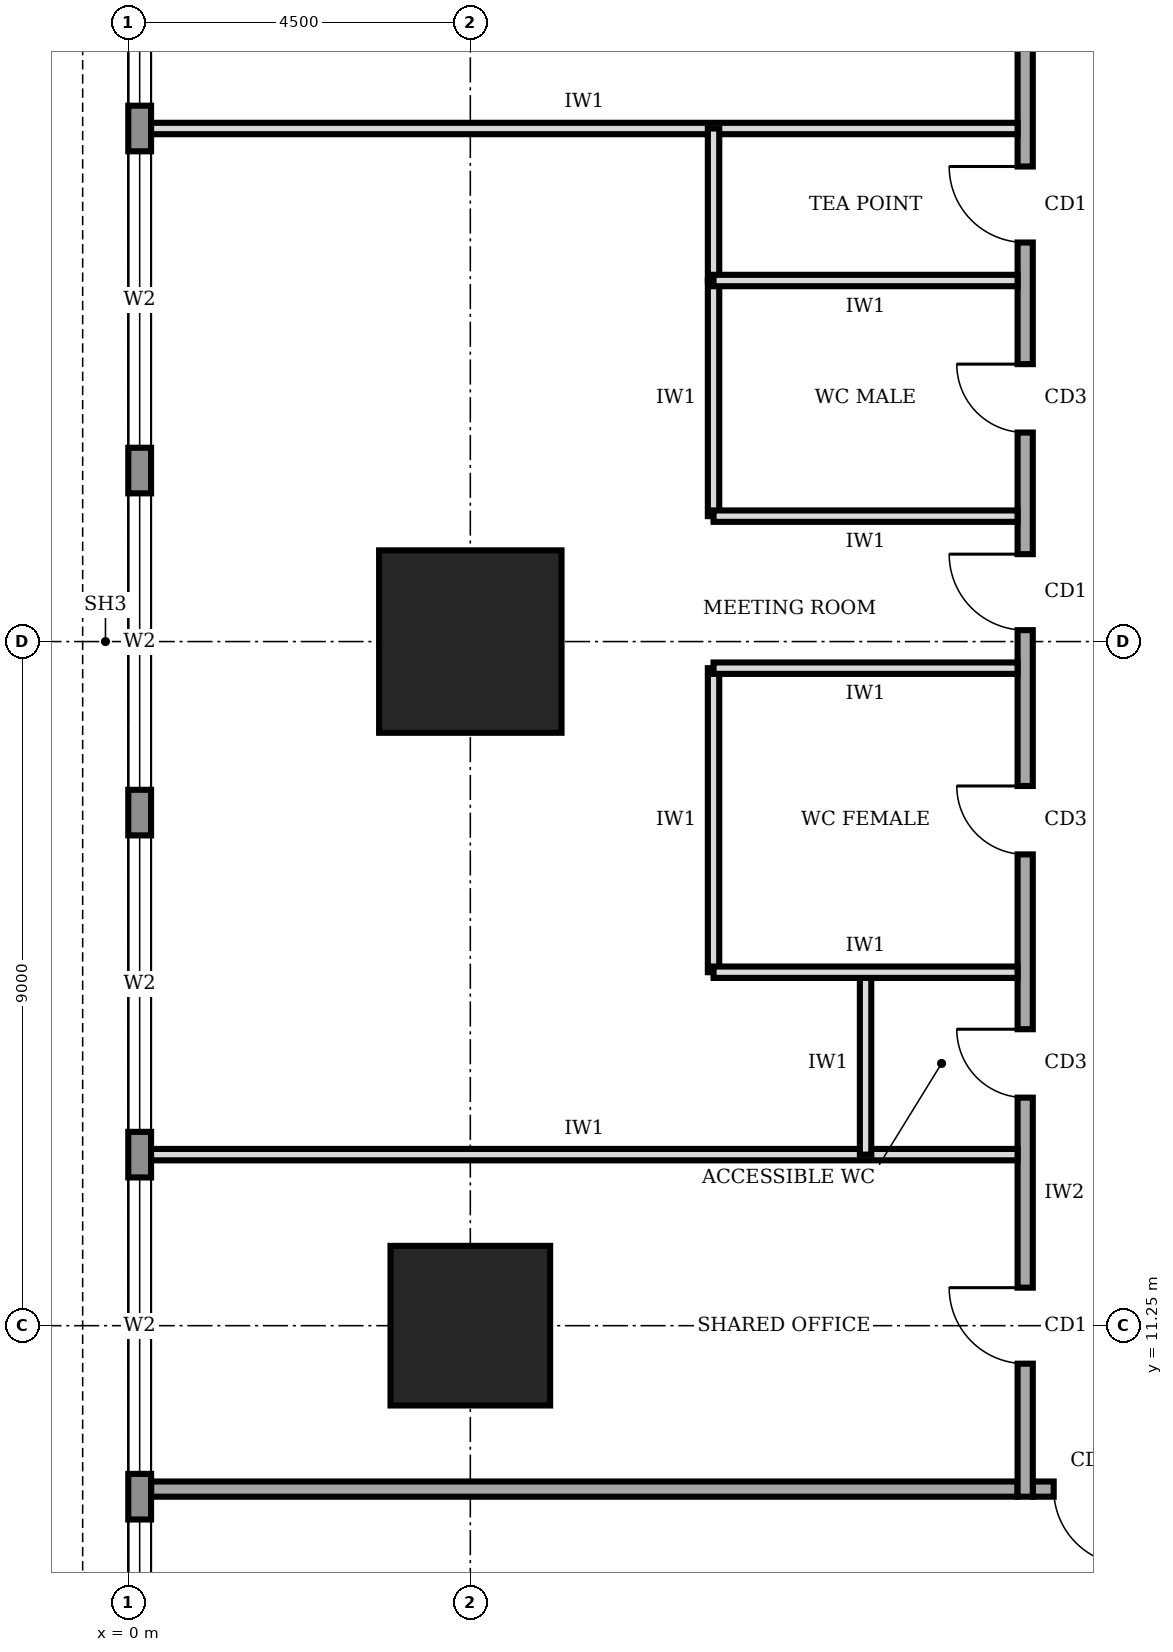
"""IFC4 building model, lengths in metres.
Left out: names, types, materials, properties, quantities, classifications, styles, units other than length and angle.
Written with IfcOpenShell. Run it as: python <this file> out.ifc"""

import sys

from ifc_helpers import new_model, si_unit, direction, frame, frame_2d, origin, origin_2d, place, context, subcontext, project, spatial, rectangle, extrude, element, fill, save


model = new_model("IFC4")
c1 = context("Model", 3, precision=1e-05, world=origin(), true_north=direction((0.0, 1.0)))
c2 = subcontext(c1, "Body", "Model", "MODEL_VIEW")
j1 = project(units=[si_unit("LENGTHUNIT", "METRE"), si_unit("PLANEANGLEUNIT", "RADIAN")], contexts=[c1])
p1 = place(None, origin())
s1 = spatial("IfcSite", under=j1, at=p1, CompositionType="ELEMENT")
p2 = place(p1, origin())
s2 = spatial("IfcBuilding", under=s1, at=p2, CompositionType="ELEMENT")
p3 = place(p2, frame((0.0, 0.0, 145.0)))
s3 = spatial("IfcBuildingStorey", under=s2, at=p3, CompositionType="ELEMENT", Elevation=145.0)
p4 = place(p3, frame((4.5, 11.25, 0.0), z_axis=(0.0, 0.0, 1.0), x_axis=(1.0, 0.0, 0.0)))
e1 = element("IfcColumn", 1, at=p4, inside=s3, PredefinedType="COLUMN", context=c2, shape_type="SweptSolid", body=[
    extrude(rectangle(XDim=2.1, YDim=2.1, at=origin_2d()), origin(), (0.0, 0.0, 1.0), 4.0),
])
p5 = place(p3, frame((4.5, 20.25, 0.0), z_axis=(0.0, 0.0, 1.0), x_axis=(1.0, 0.0, 0.0)))
e2 = element("IfcColumn", 2, at=p5, inside=s3, PredefinedType="COLUMN", context=c2, shape_type="SweptSolid", body=[
    extrude(rectangle(XDim=2.4, YDim=2.4, at=origin_2d()), origin(), (0.0, 0.0, 1.0), 4.0),
])
p6 = place(p3, frame((0.15, 35.98, 0.0), z_axis=(0.0, 0.0, 1.0), x_axis=(0.0, -1.0, 0.0)))
e3 = element("IfcWall", 3, at=p6, inside=s3, PredefinedType="STANDARD", context=c2, shape_type="SweptSolid", body=[
    extrude(rectangle(XDim=31.46, YDim=0.3, at=frame_2d((15.73, 0.0))), origin(), (0.0, 0.0, 1.0), 3.75),
])
p7 = place(p6, frame((27.28, 0.0, 0.6)))
e4 = element("IfcOpeningElement", 4, at=p7, cuts=e3, PredefinedType="OPENING", context=c2, shape_type="SweptSolid", body=[
    extrude(rectangle(XDim=3.9, YDim=2.6, at=frame_2d((1.95, 1.3))), frame((0.0, 0.16, 0.0), z_axis=(0.0, -1.0, 0.0), x_axis=(1.0, 0.0, 0.0)), (0.0, 0.0, 1.0), 0.32),
])
p8 = place(p6, frame((22.78, 0.0, 0.6)))
e5 = element("IfcOpeningElement", 5, at=p8, cuts=e3, PredefinedType="OPENING", context=c2, shape_type="SweptSolid", body=[
    extrude(rectangle(XDim=3.9, YDim=2.6, at=frame_2d((1.95, 1.3))), frame((0.0, 0.16, 0.0), z_axis=(0.0, -1.0, 0.0), x_axis=(1.0, 0.0, 0.0)), (0.0, 0.0, 1.0), 0.32),
])
p9 = place(p6, frame((18.28, 0.0, 0.6)))
e6 = element("IfcOpeningElement", 6, at=p9, cuts=e3, PredefinedType="OPENING", context=c2, shape_type="SweptSolid", body=[
    extrude(rectangle(XDim=3.9, YDim=2.6, at=frame_2d((1.95, 1.3))), frame((0.0, 0.16, 0.0), z_axis=(0.0, -1.0, 0.0), x_axis=(1.0, 0.0, 0.0)), (0.0, 0.0, 1.0), 0.32),
])
p10 = place(p6, frame((13.78, 0.0, 0.6)))
e7 = element("IfcOpeningElement", 7, at=p10, cuts=e3, PredefinedType="OPENING", context=c2, shape_type="SweptSolid", body=[
    extrude(rectangle(XDim=3.9, YDim=2.6, at=frame_2d((1.95, 1.3))), frame((0.0, 0.16, 0.0), z_axis=(0.0, -1.0, 0.0), x_axis=(1.0, 0.0, 0.0)), (0.0, 0.0, 1.0), 0.32),
])
p11 = place(p6, frame((9.28, 0.0, 0.6)))
e8 = element("IfcOpeningElement", 8, at=p11, cuts=e3, PredefinedType="OPENING", context=c2, shape_type="SweptSolid", body=[
    extrude(rectangle(XDim=3.9, YDim=2.6, at=frame_2d((1.95, 1.3))), frame((0.0, 0.16, 0.0), z_axis=(0.0, -1.0, 0.0), x_axis=(1.0, 0.0, 0.0)), (0.0, 0.0, 1.0), 0.32),
])
p12 = place(p6, frame((4.78, 0.0, 0.6)))
e9 = element("IfcOpeningElement", 9, at=p12, cuts=e3, PredefinedType="OPENING", context=c2, shape_type="SweptSolid", body=[
    extrude(rectangle(XDim=3.9, YDim=2.6, at=frame_2d((1.95, 1.3))), frame((0.0, 0.16, 0.0), z_axis=(0.0, -1.0, 0.0), x_axis=(1.0, 0.0, 0.0)), (0.0, 0.0, 1.0), 0.32),
])
p13 = place(p3, frame((11.9, 9.1, 0.0), z_axis=(0.0, 0.0, 1.0), x_axis=(1.0, 0.0, 0.0)))
e10 = element("IfcWall", 10, at=p13, inside=s3, PredefinedType="SOLIDWALL", context=c2, shape_type="SweptSolid", body=[
    extrude(rectangle(XDim=28.3, YDim=0.2, at=frame_2d((14.15, 0.0))), origin(), (0.0, 0.0, 1.0), 3.75),
])
p14 = place(p13, frame((0.275, 0.0, 0.0)))
e11 = element("IfcOpeningElement", 11, at=p14, cuts=e10, PredefinedType="OPENING", context=c2, shape_type="SweptSolid", body=[
    extrude(rectangle(XDim=1.0, YDim=2.1, at=frame_2d((0.5, 1.05))), frame((0.0, 0.11, 0.0), z_axis=(0.0, -1.0, 0.0), x_axis=(1.0, 0.0, 0.0)), (0.0, 0.0, 1.0), 0.22),
])
p15 = place(p13, frame((5.6, 0.0, 0.0)))
e12 = element("IfcOpeningElement", 12, at=p15, cuts=e10, PredefinedType="OPENING", context=c2, shape_type="SweptSolid", body=[
    extrude(rectangle(XDim=1.0, YDim=2.1, at=frame_2d((0.5, 1.05))), frame((0.0, 0.11, 0.0), z_axis=(0.0, -1.0, 0.0), x_axis=(1.0, 0.0, 0.0)), (0.0, 0.0, 1.0), 0.22),
])
p16 = place(p13, frame((12.35, 0.0, 0.0)))
e13 = element("IfcOpeningElement", 13, at=p16, cuts=e10, PredefinedType="OPENING", context=c2, shape_type="SweptSolid", body=[
    extrude(rectangle(XDim=1.0, YDim=2.1, at=frame_2d((0.5, 1.05))), frame((0.0, 0.11, 0.0), z_axis=(0.0, -1.0, 0.0), x_axis=(1.0, 0.0, 0.0)), (0.0, 0.0, 1.0), 0.22),
])
p17 = place(p13, frame((20.9, 0.0, 0.0)))
e14 = element("IfcOpeningElement", 14, at=p17, cuts=e10, PredefinedType="OPENING", context=c2, shape_type="SweptSolid", body=[
    extrude(rectangle(XDim=1.8, YDim=2.1, at=frame_2d((0.9, 1.05))), frame((0.0, 0.11, 0.0), z_axis=(0.0, -1.0, 0.0), x_axis=(1.0, 0.0, 0.0)), (0.0, 0.0, 1.0), 0.22),
])
p18 = place(p3, frame((11.8, 31.3, 0.0), z_axis=(0.0, 0.0, 1.0), x_axis=(0.0, -1.0, 0.0)))
e15 = element("IfcWall", 15, at=p18, inside=s3, PredefinedType="SOLIDWALL", context=c2, shape_type="SweptSolid", body=[
    extrude(rectangle(XDim=22.3, YDim=0.2, at=frame_2d((11.15, 0.0))), origin(), (0.0, 0.0, 1.0), 3.75),
])
p19 = place(p18, frame((19.55, 0.0, 0.0)))
e16 = element("IfcOpeningElement", 16, at=p19, cuts=e15, PredefinedType="OPENING", context=c2, shape_type="SweptSolid", body=[
    extrude(rectangle(XDim=1.0, YDim=2.1, at=frame_2d((0.5, 1.05))), frame((0.0, 0.11, 0.0), z_axis=(0.0, -1.0, 0.0), x_axis=(1.0, 0.0, 0.0)), (0.0, 0.0, 1.0), 0.22),
])
p20 = place(p18, frame((16.15, 0.0, 0.0)))
e17 = element("IfcOpeningElement", 17, at=p20, cuts=e15, PredefinedType="OPENING", context=c2, shape_type="SweptSolid", body=[
    extrude(rectangle(XDim=0.9, YDim=2.1, at=frame_2d((0.45, 1.05))), frame((0.0, 0.11, 0.0), z_axis=(0.0, -1.0, 0.0), x_axis=(1.0, 0.0, 0.0)), (0.0, 0.0, 1.0), 0.22),
])
p21 = place(p18, frame((12.95, 0.0, 0.0)))
e18 = element("IfcOpeningElement", 18, at=p21, cuts=e15, PredefinedType="OPENING", context=c2, shape_type="SweptSolid", body=[
    extrude(rectangle(XDim=0.9, YDim=2.1, at=frame_2d((0.45, 1.05))), frame((0.0, 0.11, 0.0), z_axis=(0.0, -1.0, 0.0), x_axis=(1.0, 0.0, 0.0)), (0.0, 0.0, 1.0), 0.22),
])
p22 = place(p18, frame((7.4, 0.0, 0.0)))
e19 = element("IfcOpeningElement", 19, at=p22, cuts=e15, PredefinedType="OPENING", context=c2, shape_type="SweptSolid", body=[
    extrude(rectangle(XDim=0.9, YDim=2.1, at=frame_2d((0.45, 1.05))), frame((0.0, 0.11, 0.0), z_axis=(0.0, -1.0, 0.0), x_axis=(1.0, 0.0, 0.0)), (0.0, 0.0, 1.0), 0.22),
])
p23 = place(p18, frame((4.8, 0.0, 0.0)))
e20 = element("IfcOpeningElement", 20, at=p23, cuts=e15, PredefinedType="OPENING", context=c2, shape_type="SweptSolid", body=[
    extrude(rectangle(XDim=1.0, YDim=2.1, at=frame_2d((0.5, 1.05))), frame((0.0, 0.11, 0.0), z_axis=(0.0, -1.0, 0.0), x_axis=(1.0, 0.0, 0.0)), (0.0, 0.0, 1.0), 0.22),
])
p24 = place(p18, frame((9.9, 0.0, 0.0)))
e21 = element("IfcOpeningElement", 21, at=p24, cuts=e15, PredefinedType="OPENING", context=c2, shape_type="SweptSolid", body=[
    extrude(rectangle(XDim=1.0, YDim=2.1, at=frame_2d((0.5, 1.05))), frame((0.0, 0.11, 0.0), z_axis=(0.0, -1.0, 0.0), x_axis=(1.0, 0.0, 0.0)), (0.0, 0.0, 1.0), 0.22),
])
p25 = place(p18, frame((1.55, 0.0, 0.0)))
e22 = element("IfcOpeningElement", 22, at=p25, cuts=e15, PredefinedType="OPENING", context=c2, shape_type="SweptSolid", body=[
    extrude(rectangle(XDim=1.0, YDim=2.1, at=frame_2d((0.5, 1.05))), frame((0.0, 0.11, 0.0), z_axis=(0.0, -1.0, 0.0), x_axis=(1.0, 0.0, 0.0)), (0.0, 0.0, 1.0), 0.22),
])
p26 = place(p3, frame((0.3, 9.1, 0.0), z_axis=(0.0, 0.0, 1.0), x_axis=(1.0, 0.0, 0.0)))
e23 = element("IfcWall", 23, at=p26, inside=s3, PredefinedType="SOLIDWALL", context=c2, shape_type="SweptSolid", body=[
    extrude(rectangle(XDim=11.4, YDim=0.2, at=frame_2d((5.7, 0.0))), origin(), (0.0, 0.0, 1.0), 3.75),
])
for number, where, z_axis, x_axis in (
    (24, (0.3, 13.5, 0.0), (0.0, 0.0, 1.0), (1.0, 0.0, 0.0)),
    (25, (0.3, 27.0, 0.0), (0.0, 0.0, 1.0), (1.0, 0.0, 0.0)),
):
    element("IfcWall", number, at=place(p3, frame(where, z_axis=z_axis, x_axis=x_axis)), inside=s3, PredefinedType="PARTITIONING", context=c2, shape_type="SweptSolid", body=[
        extrude(rectangle(XDim=11.4, YDim=0.15, at=frame_2d((5.7, 0.0))), origin(), (0.0, 0.0, 1.0), 3.75),
    ])
p27 = place(p3, frame((11.7, 15.9, 0.0), z_axis=(0.0, 0.0, 1.0), x_axis=(-1.0, 0.0, 0.0)))
e26 = element("IfcWall", 26, at=p27, inside=s3, PredefinedType="PARTITIONING", context=c2, shape_type="SweptSolid", body=[
    extrude(rectangle(XDim=4.0, YDim=0.15, at=frame_2d((2.0, 0.0))), origin(), (0.0, 0.0, 1.0), 3.75),
])
p28 = place(p3, frame((11.7, 19.9, 0.0), z_axis=(0.0, 0.0, 1.0), x_axis=(-1.0, 0.0, 0.0)))
e27 = element("IfcWall", 27, at=p28, inside=s3, PredefinedType="PARTITIONING", context=c2, shape_type="SweptSolid", body=[
    extrude(rectangle(XDim=4.0, YDim=0.15, at=frame_2d((2.0, 0.0))), origin(), (0.0, 0.0, 1.0), 2.85),
])
for number, where, z_axis, x_axis in (
    (28, (11.7, 21.9, 0.0), (0.0, 0.0, 1.0), (-1.0, 0.0, 0.0)),
    (29, (11.7, 25.0, 0.0), (0.0, 0.0, 1.0), (-1.0, 0.0, 0.0)),
):
    element("IfcWall", number, at=place(p3, frame(where, z_axis=z_axis, x_axis=x_axis)), inside=s3, PredefinedType="PARTITIONING", context=c2, shape_type="SweptSolid", body=[
        extrude(rectangle(XDim=4.0, YDim=0.15, at=frame_2d((2.0, 0.0))), origin(), (0.0, 0.0, 1.0), 3.75),
    ])
p29 = place(p3, frame((9.7, 13.5, 0.0), z_axis=(0.0, 0.0, 1.0), x_axis=(0.0, 1.0, 0.0)))
e30 = element("IfcWall", 30, at=p29, inside=s3, PredefinedType="PARTITIONING", context=c2, shape_type="SweptSolid", body=[
    extrude(rectangle(XDim=2.4, YDim=0.15, at=frame_2d((1.2, 0.0))), origin(), (0.0, 0.0, 1.0), 3.75),
])
p30 = place(p3, frame((7.7, 15.9, 0.0), z_axis=(0.0, 0.0, 1.0), x_axis=(0.0, 1.0, 0.0)))
e31 = element("IfcWall", 31, at=p30, inside=s3, PredefinedType="PARTITIONING", context=c2, shape_type="SweptSolid", body=[
    extrude(rectangle(XDim=4.0, YDim=0.15, at=frame_2d((2.0, 0.0))), origin(), (0.0, 0.0, 1.0), 3.75),
])
p31 = place(p3, frame((7.7, 21.9, 0.0), z_axis=(0.0, 0.0, 1.0), x_axis=(0.0, 1.0, 0.0)))
e32 = element("IfcWall", 32, at=p31, inside=s3, PredefinedType="PARTITIONING", context=c2, shape_type="SweptSolid", body=[
    extrude(rectangle(XDim=3.1, YDim=0.15, at=frame_2d((1.55, 0.0))), origin(), (0.0, 0.0, 1.0), 3.75),
])
p32 = place(p3, frame((7.7, 25.0, 0.0), z_axis=(0.0, 0.0, 1.0), x_axis=(0.0, 1.0, 0.0)))
e33 = element("IfcWall", 33, at=p32, inside=s3, PredefinedType="PARTITIONING", context=c2, shape_type="SweptSolid", body=[
    extrude(rectangle(XDim=2.0, YDim=0.15, at=frame_2d((1.0, 0.0))), origin(), (0.0, 0.0, 1.0), 3.75),
])
p33 = place(p7, origin())
e34 = element("IfcWindow", 34, at=p33, inside=s3, PartitioningType="SINGLE_PANEL", PredefinedType="WINDOW", context=c2, shape_type="SweptSolid", body=[
    extrude(rectangle(XDim=3.9, YDim=2.6, at=frame_2d((1.95, 1.3))), frame((0.0, 0.03, 0.0), z_axis=(0.0, -1.0, 0.0), x_axis=(1.0, 0.0, 0.0)), (0.0, 0.0, 1.0), 0.06),
])
fill(e4, e34)
p34 = place(p8, origin())
e35 = element("IfcWindow", 35, at=p34, inside=s3, PartitioningType="SINGLE_PANEL", PredefinedType="WINDOW", context=c2, shape_type="SweptSolid", body=[
    extrude(rectangle(XDim=3.9, YDim=2.6, at=frame_2d((1.95, 1.3))), frame((0.0, 0.03, 0.0), z_axis=(0.0, -1.0, 0.0), x_axis=(1.0, 0.0, 0.0)), (0.0, 0.0, 1.0), 0.06),
])
fill(e5, e35)
p35 = place(p9, origin())
e36 = element("IfcWindow", 36, at=p35, inside=s3, PartitioningType="SINGLE_PANEL", PredefinedType="WINDOW", context=c2, shape_type="SweptSolid", body=[
    extrude(rectangle(XDim=3.9, YDim=2.6, at=frame_2d((1.95, 1.3))), frame((0.0, 0.03, 0.0), z_axis=(0.0, -1.0, 0.0), x_axis=(1.0, 0.0, 0.0)), (0.0, 0.0, 1.0), 0.06),
])
fill(e6, e36)
p36 = place(p10, origin())
e37 = element("IfcWindow", 37, at=p36, inside=s3, PartitioningType="SINGLE_PANEL", PredefinedType="WINDOW", context=c2, shape_type="SweptSolid", body=[
    extrude(rectangle(XDim=3.9, YDim=2.6, at=frame_2d((1.95, 1.3))), frame((0.0, 0.03, 0.0), z_axis=(0.0, -1.0, 0.0), x_axis=(1.0, 0.0, 0.0)), (0.0, 0.0, 1.0), 0.06),
])
fill(e7, e37)
p37 = place(p11, origin())
e38 = element("IfcWindow", 38, at=p37, inside=s3, PartitioningType="SINGLE_PANEL", PredefinedType="WINDOW", context=c2, shape_type="SweptSolid", body=[
    extrude(rectangle(XDim=3.9, YDim=2.6, at=frame_2d((1.95, 1.3))), frame((0.0, 0.03, 0.0), z_axis=(0.0, -1.0, 0.0), x_axis=(1.0, 0.0, 0.0)), (0.0, 0.0, 1.0), 0.06),
])
fill(e8, e38)
p38 = place(p12, origin())
e39 = element("IfcWindow", 39, at=p38, inside=s3, PartitioningType="SINGLE_PANEL", PredefinedType="WINDOW", context=c2, shape_type="SweptSolid", body=[
    extrude(rectangle(XDim=3.9, YDim=2.6, at=frame_2d((1.95, 1.3))), frame((0.0, 0.03, 0.0), z_axis=(0.0, -1.0, 0.0), x_axis=(1.0, 0.0, 0.0)), (0.0, 0.0, 1.0), 0.06),
])
fill(e9, e39)
p39 = place(p14, frame((1.0, 0.0, 0.0), z_axis=(0.0, 0.0, 1.0), x_axis=(-1.0, 0.0, 0.0)))
e40 = element("IfcDoor", 40, at=p39, inside=s3, OperationType="SINGLE_SWING_LEFT", PredefinedType="DOOR", context=c2, shape_type="SweptSolid", body=[
    extrude(rectangle(XDim=1.0, YDim=2.1, at=frame_2d((0.5, 1.05))), frame((0.0, 0.025, 0.0), z_axis=(0.0, -1.0, 0.0), x_axis=(1.0, 0.0, 0.0)), (0.0, 0.0, 1.0), 0.05),
])
fill(e11, e40)
p40 = place(p19, frame((1.0, 0.0, 0.0), z_axis=(0.0, 0.0, 1.0), x_axis=(-1.0, 0.0, 0.0)))
e41 = element("IfcDoor", 41, at=p40, inside=s3, OperationType="SINGLE_SWING_RIGHT", PredefinedType="DOOR", context=c2, shape_type="SweptSolid", body=[
    extrude(rectangle(XDim=1.0, YDim=2.1, at=frame_2d((0.5, 1.05))), frame((0.0, 0.025, 0.0), z_axis=(0.0, -1.0, 0.0), x_axis=(1.0, 0.0, 0.0)), (0.0, 0.0, 1.0), 0.05),
])
fill(e16, e41)
p41 = place(p20, frame((0.9, 0.0, 0.0), z_axis=(0.0, 0.0, 1.0), x_axis=(-1.0, 0.0, 0.0)))
e42 = element("IfcDoor", 42, at=p41, inside=s3, OperationType="SINGLE_SWING_RIGHT", PredefinedType="DOOR", context=c2, shape_type="SweptSolid", body=[
    extrude(rectangle(XDim=0.9, YDim=2.1, at=frame_2d((0.45, 1.05))), frame((0.0, 0.025, 0.0), z_axis=(0.0, -1.0, 0.0), x_axis=(1.0, 0.0, 0.0)), (0.0, 0.0, 1.0), 0.05),
])
fill(e17, e42)
p42 = place(p21, frame((0.9, 0.0, 0.0), z_axis=(0.0, 0.0, 1.0), x_axis=(-1.0, 0.0, 0.0)))
e43 = element("IfcDoor", 43, at=p42, inside=s3, OperationType="SINGLE_SWING_RIGHT", PredefinedType="DOOR", context=c2, shape_type="SweptSolid", body=[
    extrude(rectangle(XDim=0.9, YDim=2.1, at=frame_2d((0.45, 1.05))), frame((0.0, 0.025, 0.0), z_axis=(0.0, -1.0, 0.0), x_axis=(1.0, 0.0, 0.0)), (0.0, 0.0, 1.0), 0.05),
])
fill(e18, e43)
p43 = place(p22, frame((0.9, 0.0, 0.0), z_axis=(0.0, 0.0, 1.0), x_axis=(-1.0, 0.0, 0.0)))
e44 = element("IfcDoor", 44, at=p43, inside=s3, OperationType="SINGLE_SWING_RIGHT", PredefinedType="DOOR", context=c2, shape_type="SweptSolid", body=[
    extrude(rectangle(XDim=0.9, YDim=2.1, at=frame_2d((0.45, 1.05))), frame((0.0, 0.025, 0.0), z_axis=(0.0, -1.0, 0.0), x_axis=(1.0, 0.0, 0.0)), (0.0, 0.0, 1.0), 0.05),
])
fill(e19, e44)
p44 = place(p23, frame((1.0, 0.0, 0.0), z_axis=(0.0, 0.0, 1.0), x_axis=(-1.0, 0.0, 0.0)))
e45 = element("IfcDoor", 45, at=p44, inside=s3, OperationType="SINGLE_SWING_RIGHT", PredefinedType="DOOR", context=c2, shape_type="SweptSolid", body=[
    extrude(rectangle(XDim=1.0, YDim=2.1, at=frame_2d((0.5, 1.05))), frame((0.0, 0.025, 0.0), z_axis=(0.0, -1.0, 0.0), x_axis=(1.0, 0.0, 0.0)), (0.0, 0.0, 1.0), 0.05),
])
fill(e20, e45)
p45 = place(p24, frame((1.0, 0.0, 0.0), z_axis=(0.0, 0.0, 1.0), x_axis=(-1.0, 0.0, 0.0)))
e46 = element("IfcDoor", 46, at=p45, inside=s3, OperationType="SINGLE_SWING_RIGHT", PredefinedType="DOOR", context=c2, shape_type="SweptSolid", body=[
    extrude(rectangle(XDim=1.0, YDim=2.1, at=frame_2d((0.5, 1.05))), frame((0.0, 0.025, 0.0), z_axis=(0.0, -1.0, 0.0), x_axis=(1.0, 0.0, 0.0)), (0.0, 0.0, 1.0), 0.05),
])
fill(e21, e46)
save(model, sys.argv[1])
